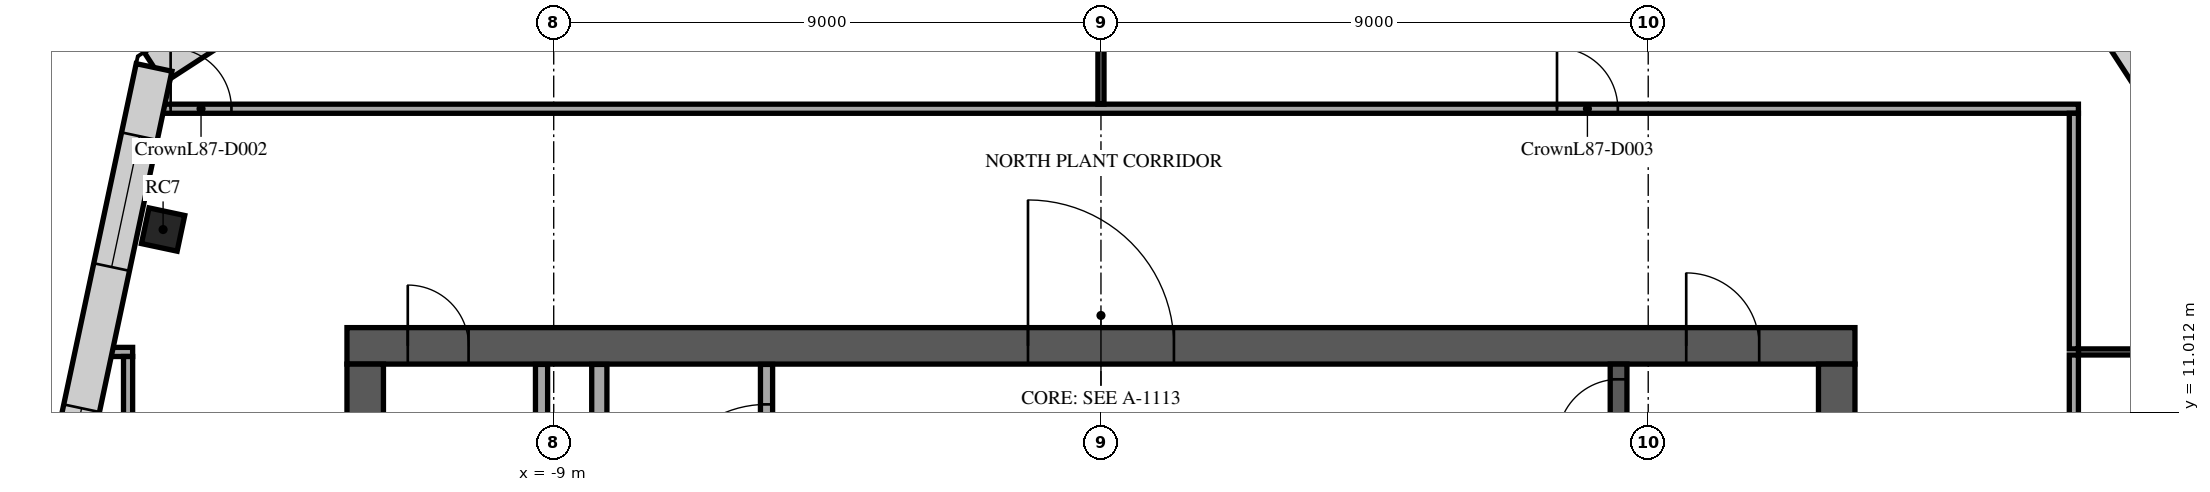
"""IFC4 building model, lengths in metres.
Left out: names, types, materials, properties, quantities, classifications, styles, units other than length and angle.
Written with IfcOpenShell. Run it as: python <this file> out.ifc"""

import sys

from ifc_helpers import new_model, si_unit, direction, frame, frame_2d, origin, origin_2d, place, context, subcontext, project, spatial, rectangle, extrude, element, fill, save


model = new_model("IFC4")
c1 = context("Model", 3, precision=1e-05, world=origin(), true_north=direction((0.0, 1.0)))
c2 = subcontext(c1, "Body", "Model", "MODEL_VIEW")
j1 = project(units=[si_unit("LENGTHUNIT", "METRE"), si_unit("PLANEANGLEUNIT", "RADIAN")], contexts=[c1])
p1 = place(None, origin())
s1 = spatial("IfcSite", under=j1, at=p1, CompositionType="ELEMENT")
p2 = place(p1, origin())
s2 = spatial("IfcBuilding", under=s1, at=p2, CompositionType="ELEMENT")
p3 = place(p2, frame((0.0, 0.0, 373.1)))
s3 = spatial("IfcBuildingStorey", under=s2, at=p3, CompositionType="ELEMENT", Elevation=373.1)
p4 = place(p3, frame((-15.424, 14.013, 0.0), z_axis=(0.0, 0.0, 1.0), x_axis=(0.207911690818, 0.978147600734, 0.0)))
e1 = element("IfcColumn", 1, at=p4, inside=s3, PredefinedType="COLUMN", context=c2, shape_type="SweptSolid", body=[
    extrude(rectangle(XDim=0.6, YDim=0.6, at=origin_2d()), origin(), (0.0, 0.0, 1.0), 3.5),
])
p5 = place(p3, frame((-12.4, 12.1, 0.0), z_axis=(0.0, 0.0, 1.0), x_axis=(1.0, 0.0, 0.0)))
e2 = element("IfcWall", 2, at=p5, inside=s3, PredefinedType="SHEAR", context=c2, shape_type="SweptSolid", body=[
    extrude(rectangle(XDim=24.8, YDim=0.6, at=frame_2d((12.4, 0.0))), origin(), (0.0, 0.0, 1.0), 3.2),
])
p6 = place(p5, frame((11.2, 0.0, 0.0)))
e3 = element("IfcOpeningElement", 3, at=p6, cuts=e2, PredefinedType="OPENING", context=c2, shape_type="SweptSolid", body=[
    extrude(rectangle(XDim=2.4, YDim=2.4, at=frame_2d((1.2, 1.2))), frame((0.0, 0.31, 0.0), z_axis=(0.0, -1.0, 0.0), x_axis=(1.0, 0.0, 0.0)), (0.0, 0.0, 1.0), 0.62),
])
p7 = place(p5, frame((22.025, 0.0, 0.0)))
e4 = element("IfcOpeningElement", 4, at=p7, cuts=e2, PredefinedType="OPENING", context=c2, shape_type="SweptSolid", body=[
    extrude(rectangle(XDim=1.2, YDim=2.1, at=frame_2d((0.6, 1.05))), frame((0.0, 0.31, 0.0), z_axis=(0.0, -1.0, 0.0), x_axis=(1.0, 0.0, 0.0)), (0.0, 0.0, 1.0), 0.62),
])
p8 = place(p5, frame((1.0, 0.0, 0.0)))
e5 = element("IfcOpeningElement", 5, at=p8, cuts=e2, PredefinedType="OPENING", context=c2, shape_type="SweptSolid", body=[
    extrude(rectangle(XDim=1.0, YDim=2.1, at=frame_2d((0.5, 1.05))), frame((0.0, 0.31, 0.0), z_axis=(0.0, -1.0, 0.0), x_axis=(1.0, 0.0, 0.0)), (0.0, 0.0, 1.0), 0.62),
])
p9 = place(p3, frame((12.1, -11.8, 0.0), z_axis=(0.0, 0.0, 1.0), x_axis=(0.0, 1.0, 0.0)))
e6 = element("IfcWall", 6, at=p9, inside=s3, PredefinedType="SHEAR", context=c2, shape_type="SweptSolid", body=[
    extrude(rectangle(XDim=23.6, YDim=0.6, at=frame_2d((11.8, 0.0))), origin(), (0.0, 0.0, 1.0), 3.2),
])
p10 = place(p9, frame((10.6, 0.0, 0.0)))
e7 = element("IfcOpeningElement", 7, at=p10, cuts=e6, PredefinedType="OPENING", context=c2, shape_type="SweptSolid", body=[
    extrude(rectangle(XDim=2.4, YDim=2.4, at=frame_2d((1.2, 1.2))), frame((0.0, 0.31, 0.0), z_axis=(0.0, -1.0, 0.0), x_axis=(1.0, 0.0, 0.0)), (0.0, 0.0, 1.0), 0.62),
])
p11 = place(p3, frame((-12.1, -11.8, 0.0), z_axis=(0.0, 0.0, 1.0), x_axis=(0.0, 1.0, 0.0)))
e8 = element("IfcWall", 8, at=p11, inside=s3, PredefinedType="SHEAR", context=c2, shape_type="SweptSolid", body=[
    extrude(rectangle(XDim=23.6, YDim=0.6, at=frame_2d((11.8, 0.0))), origin(), (0.0, 0.0, 1.0), 3.2),
])
p12 = place(p11, frame((10.6, 0.0, 0.0)))
e9 = element("IfcOpeningElement", 9, at=p12, cuts=e8, PredefinedType="OPENING", context=c2, shape_type="SweptSolid", body=[
    extrude(rectangle(XDim=2.4, YDim=2.4, at=frame_2d((1.2, 1.2))), frame((0.0, 0.31, 0.0), z_axis=(0.0, -1.0, 0.0), x_axis=(1.0, 0.0, 0.0)), (0.0, 0.0, 1.0), 0.62),
])
p13 = place(p3, frame((8.512, 4.55, 0.0), z_axis=(0.0, 0.0, 1.0), x_axis=(0.0, 1.0, 0.0)))
e10 = element("IfcWall", 10, at=p13, inside=s3, PredefinedType="SOLIDWALL", context=c2, shape_type="SweptSolid", body=[
    extrude(rectangle(XDim=7.25, YDim=0.275, at=frame_2d((3.625, 0.0))), origin(), (0.0, 0.0, 1.0), 3.2),
])
p14 = place(p13, frame((6.0, 0.0, 0.0)))
e11 = element("IfcOpeningElement", 11, at=p14, cuts=e10, PredefinedType="OPENING", context=c2, shape_type="SweptSolid", body=[
    extrude(rectangle(XDim=1.0, YDim=2.1, at=frame_2d((0.5, 1.05))), frame((0.0, 0.147, 0.0), z_axis=(0.0, -1.0, 0.0), x_axis=(1.0, 0.0, 0.0)), (0.0, 0.0, 1.0), 0.295),
])
p15 = place(p3, frame((-9.2, 4.78, 0.0), z_axis=(0.0, 0.0, 1.0), x_axis=(0.0, 1.0, 0.0)))
e12 = element("IfcWall", 12, at=p15, inside=s3, PredefinedType="PARTITIONING", context=c2, shape_type="SweptSolid", body=[
    extrude(rectangle(XDim=7.015, YDim=0.2, at=frame_2d((3.507, 0.0))), origin(), (0.0, 0.0, 1.0), 3.2),
])
p16 = place(p15, frame((2.92, 0.0, 0.0)))
e13 = element("IfcOpeningElement", 13, at=p16, cuts=e12, PredefinedType="OPENING", context=c2, shape_type="SweptSolid", body=[
    extrude(rectangle(XDim=1.0, YDim=2.1, at=frame_2d((0.5, 1.05))), frame((0.0, 0.11, 0.0), z_axis=(0.0, -1.0, 0.0), x_axis=(1.0, 0.0, 0.0)), (0.0, 0.0, 1.0), 0.22),
])
p17 = place(p3, frame((-8.25, 8.805, 0.0), z_axis=(0.0, 0.0, 1.0), x_axis=(0.0, 1.0, 0.0)))
e14 = element("IfcWall", 14, at=p17, inside=s3, PredefinedType="PARTITIONING", context=c2, shape_type="SweptSolid", body=[
    extrude(rectangle(XDim=2.99, YDim=0.25, at=frame_2d((1.495, 0.0))), origin(), (0.0, 0.0, 1.0), 3.2),
])
p18 = place(p17, frame((0.895, 0.0, 0.0)))
e15 = element("IfcOpeningElement", 15, at=p18, cuts=e14, PredefinedType="OPENING", context=c2, shape_type="SweptSolid", body=[
    extrude(rectangle(XDim=1.0, YDim=2.1, at=frame_2d((0.5, 1.05))), frame((0.0, 0.135, 0.0), z_axis=(0.0, -1.0, 0.0), x_axis=(1.0, 0.0, 0.0)), (0.0, 0.0, 1.0), 0.27),
])
p19 = place(p3, frame((-5.5, 8.805, 0.0), z_axis=(0.0, 0.0, 1.0), x_axis=(0.0, 1.0, 0.0)))
e16 = element("IfcWall", 16, at=p19, inside=s3, PredefinedType="PARTITIONING", context=c2, shape_type="SweptSolid", body=[
    extrude(rectangle(XDim=2.99, YDim=0.2, at=frame_2d((1.495, 0.0))), origin(), (0.0, 0.0, 1.0), 3.2),
])
p20 = place(p19, frame((0.532, 0.0, 0.0)))
e17 = element("IfcOpeningElement", 17, at=p20, cuts=e16, PredefinedType="OPENING", context=c2, shape_type="SweptSolid", body=[
    extrude(rectangle(XDim=1.8, YDim=2.1, at=frame_2d((0.9, 1.05))), frame((0.0, 0.11, 0.0), z_axis=(0.0, -1.0, 0.0), x_axis=(1.0, 0.0, 0.0)), (0.0, 0.0, 1.0), 0.22),
])
p21 = place(p3, frame((-16.465, 12.0, 0.0), z_axis=(0.0, 0.0, 1.0), x_axis=(1.0, 0.0, 0.0)))
e18 = element("IfcWall", 18, at=p21, inside=s3, PredefinedType="PARTITIONING", context=c2, shape_type="SweptSolid", body=[
    extrude(rectangle(XDim=0.54, YDim=0.15, at=frame_2d((0.27, 0.0))), origin(), (0.0, 0.0, 1.0), 3.2),
])
p22 = place(p3, frame((16.075, 12.0, 0.0), z_axis=(0.0, 0.0, 1.0), x_axis=(1.0, 0.0, 0.0)))
e19 = element("IfcWall", 19, at=p22, inside=s3, PredefinedType="PARTITIONING", context=c2, shape_type="SweptSolid", body=[
    extrude(rectangle(XDim=3.997, YDim=0.1, at=frame_2d((1.999, 0.0))), origin(), (0.0, 0.0, 1.0), 3.2),
])
p23 = place(p3, frame((-15.615, 16.0, 0.0), z_axis=(0.0, 0.0, 1.0), x_axis=(1.0, 0.0, 0.0)))
e20 = element("IfcWall", 20, at=p23, inside=s3, PredefinedType="PARTITIONING", context=c2, shape_type="SweptSolid", body=[
    extrude(rectangle(XDim=31.689, YDim=0.15, at=frame_2d((15.845, 0.0))), origin(), (0.0, 0.0, 1.0), 2.63),
])
p24 = place(p23, frame((0.315, 0.0, 0.0)))
e21 = element("IfcOpeningElement", 21, at=p24, cuts=e20, PredefinedType="OPENING", context=c2, shape_type="SweptSolid", body=[
    extrude(rectangle(XDim=1.0, YDim=2.1, at=frame_2d((0.5, 1.05))), frame((0.0, 0.085, 0.0), z_axis=(0.0, -1.0, 0.0), x_axis=(1.0, 0.0, 0.0)), (0.0, 0.0, 1.0), 0.17),
])
p25 = place(p23, frame((23.115, 0.0, 0.0)))
e22 = element("IfcOpeningElement", 22, at=p25, cuts=e20, PredefinedType="OPENING", context=c2, shape_type="SweptSolid", body=[
    extrude(rectangle(XDim=1.0, YDim=2.1, at=frame_2d((0.5, 1.05))), frame((0.0, 0.085, 0.0), z_axis=(0.0, -1.0, 0.0), x_axis=(1.0, 0.0, 0.0)), (0.0, 0.0, 1.0), 0.17),
])
p26 = place(p3, frame((-16.0, -15.925, 0.0), z_axis=(0.0, 0.0, 1.0), x_axis=(0.0, 1.0, 0.0)))
e23 = element("IfcWall", 23, at=p26, inside=s3, PredefinedType="PARTITIONING", context=c2, shape_type="SweptSolid", body=[
    extrude(rectangle(XDim=27.85, YDim=0.15, at=frame_2d((13.925, 0.0))), origin(), (0.0, 0.0, 1.0), 2.63),
])
p27 = place(p26, frame((15.425, 0.0, 0.0)))
e24 = element("IfcOpeningElement", 24, at=p27, cuts=e23, PredefinedType="OPENING", context=c2, shape_type="SweptSolid", body=[
    extrude(rectangle(XDim=1.0, YDim=2.1, at=frame_2d((0.5, 1.05))), frame((0.0, 0.085, 0.0), z_axis=(0.0, -1.0, 0.0), x_axis=(1.0, 0.0, 0.0)), (0.0, 0.0, 1.0), 0.17),
])
p28 = place(p3, frame((0.0, 16.075, 0.0), z_axis=(0.0, 0.0, 1.0), x_axis=(0.0, 1.0, 0.0)))
e25 = element("IfcWall", 25, at=p28, inside=s3, PredefinedType="PARTITIONING", context=c2, shape_type="SweptSolid", body=[
    extrude(rectangle(XDim=6.008, YDim=0.1, at=frame_2d((3.004, 0.0))), origin(), (0.0, 0.0, 1.0), 3.2),
])
p29 = place(p3, frame((16.0, -11.925, 0.0), z_axis=(0.0, 0.0, 1.0), x_axis=(0.0, 1.0, 0.0)))
e26 = element("IfcWall", 26, at=p29, inside=s3, PredefinedType="PARTITIONING", context=c2, shape_type="SweptSolid", body=[
    extrude(rectangle(XDim=23.875, YDim=0.15, at=frame_2d((11.938, 0.0))), origin(), (0.0, 0.0, 1.0), 2.63),
])
p30 = place(p29, frame((11.425, 0.0, 0.0)))
e27 = element("IfcOpeningElement", 27, at=p30, cuts=e26, PredefinedType="OPENING", context=c2, shape_type="SweptSolid", body=[
    extrude(rectangle(XDim=1.0, YDim=2.1, at=frame_2d((0.5, 1.05))), frame((0.0, 0.085, 0.0), z_axis=(0.0, -1.0, 0.0), x_axis=(1.0, 0.0, 0.0)), (0.0, 0.0, 1.0), 0.17),
])
p31 = place(p3, frame((16.0, 12.05, 0.0), z_axis=(0.0, 0.0, 1.0), x_axis=(0.0, 1.0, 0.0)))
e28 = element("IfcWall", 28, at=p31, inside=s3, PredefinedType="PARTITIONING", context=c2, shape_type="SweptSolid", body=[
    extrude(rectangle(XDim=3.875, YDim=0.15, at=frame_2d((1.938, 0.0))), origin(), (0.0, 0.0, 1.0), 2.63),
])
p32 = place(p3, frame((21.304, 10.286, 0.0), z_axis=(0.0, 0.0, 1.0), x_axis=(-0.544646568575, 0.838665675546, 0.0)))
e29 = element("IfcWall", 29, at=p32, inside=s3, PredefinedType="STANDARD", context=c2, shape_type="SweptSolid", body=[
    extrude(rectangle(XDim=10.195, YDim=0.6, at=frame_2d((5.098, 0.0))), origin(), (0.0, 0.0, 1.0), 3.2),
])
p33 = place(p32, frame((1.149, 0.0, 0.6)))
e30 = element("IfcOpeningElement", 30, at=p33, cuts=e29, PredefinedType="OPENING", context=c2, shape_type="SweptSolid", body=[
    extrude(rectangle(XDim=2.8, YDim=1.85, at=frame_2d((1.4, 0.925))), frame((0.0, 0.31, 0.0), z_axis=(0.0, -1.0, 0.0), x_axis=(1.0, 0.0, 0.0)), (0.0, 0.0, 1.0), 0.62),
])
p34 = place(p32, frame((6.246, 0.0, 0.6)))
e31 = element("IfcOpeningElement", 31, at=p34, cuts=e29, PredefinedType="OPENING", context=c2, shape_type="SweptSolid", body=[
    extrude(rectangle(XDim=2.8, YDim=1.85, at=frame_2d((1.4, 0.925))), frame((0.0, 0.31, 0.0), z_axis=(0.0, -1.0, 0.0), x_axis=(1.0, 0.0, 0.0)), (0.0, 0.0, 1.0), 0.62),
])
p35 = place(p3, frame((-5.345, 23.321, 0.0), z_axis=(0.0, 0.0, 1.0), x_axis=(-0.838670411522, -0.544639275887, 0.0)))
e32 = element("IfcWall", 32, at=p35, inside=s3, PredefinedType="STANDARD", context=c2, shape_type="SweptSolid", body=[
    extrude(rectangle(XDim=12.195, YDim=0.6, at=frame_2d((6.097, 0.0))), origin(), (0.0, 0.0, 1.0), 3.2),
])
p36 = place(p35, frame((1.162, 0.0, 0.6)))
e33 = element("IfcOpeningElement", 33, at=p36, cuts=e32, PredefinedType="OPENING", context=c2, shape_type="SweptSolid", body=[
    extrude(rectangle(XDim=1.7, YDim=1.85, at=frame_2d((0.85, 0.925))), frame((0.0, 0.31, 0.0), z_axis=(0.0, -1.0, 0.0), x_axis=(1.0, 0.0, 0.0)), (0.0, 0.0, 1.0), 0.62),
])
p37 = place(p35, frame((5.248, 0.0, 0.6)))
e34 = element("IfcOpeningElement", 34, at=p37, cuts=e32, PredefinedType="OPENING", context=c2, shape_type="SweptSolid", body=[
    extrude(rectangle(XDim=1.7, YDim=1.85, at=frame_2d((0.85, 0.925))), frame((0.0, 0.31, 0.0), z_axis=(0.0, -1.0, 0.0), x_axis=(1.0, 0.0, 0.0)), (0.0, 0.0, 1.0), 0.62),
])
p38 = place(p35, frame((9.333, 0.0, 0.6)))
e35 = element("IfcOpeningElement", 35, at=p38, cuts=e32, PredefinedType="OPENING", context=c2, shape_type="SweptSolid", body=[
    extrude(rectangle(XDim=1.7, YDim=1.85, at=frame_2d((0.85, 0.925))), frame((0.0, 0.31, 0.0), z_axis=(0.0, -1.0, 0.0), x_axis=(1.0, 0.0, 0.0)), (0.0, 0.0, 1.0), 0.62),
])
p39 = place(p3, frame((-15.573, 16.679, 0.0), z_axis=(0.0, 0.0, 1.0), x_axis=(-0.207912773383, -0.978147370627, 0.0)))
e36 = element("IfcWall", 36, at=p39, inside=s3, PredefinedType="STANDARD", context=c2, shape_type="SweptSolid", body=[
    extrude(rectangle(XDim=27.568, YDim=0.6, at=frame_2d((13.784, 0.0))), origin(), (0.0, 0.0, 1.0), 3.2),
])
p40 = place(p39, frame((1.156, 0.0, 0.6)))
e37 = element("IfcOpeningElement", 37, at=p40, cuts=e36, PredefinedType="OPENING", context=c2, shape_type="SweptSolid", body=[
    extrude(rectangle(XDim=2.2, YDim=1.85, at=frame_2d((1.1, 0.925))), frame((0.0, 0.31, 0.0), z_axis=(0.0, -1.0, 0.0), x_axis=(1.0, 0.0, 0.0)), (0.0, 0.0, 1.0), 0.62),
])
p41 = place(p39, frame((5.73, 0.0, 0.6)))
e38 = element("IfcOpeningElement", 38, at=p41, cuts=e36, PredefinedType="OPENING", context=c2, shape_type="SweptSolid", body=[
    extrude(rectangle(XDim=2.2, YDim=1.85, at=frame_2d((1.1, 0.925))), frame((0.0, 0.31, 0.0), z_axis=(0.0, -1.0, 0.0), x_axis=(1.0, 0.0, 0.0)), (0.0, 0.0, 1.0), 0.62),
])
p42 = place(p39, frame((10.366, 0.0, 0.6)))
e39 = element("IfcOpeningElement", 39, at=p42, cuts=e36, PredefinedType="OPENING", context=c2, shape_type="SweptSolid", body=[
    extrude(rectangle(XDim=2.2, YDim=1.85, at=frame_2d((1.1, 0.925))), frame((0.0, 0.31, 0.0), z_axis=(0.0, -1.0, 0.0), x_axis=(1.0, 0.0, 0.0)), (0.0, 0.0, 1.0), 0.62),
])
p43 = place(p39, frame((15.002, 0.0, 0.6)))
e40 = element("IfcOpeningElement", 40, at=p43, cuts=e36, PredefinedType="OPENING", context=c2, shape_type="SweptSolid", body=[
    extrude(rectangle(XDim=2.2, YDim=1.85, at=frame_2d((1.1, 0.925))), frame((0.0, 0.31, 0.0), z_axis=(0.0, -1.0, 0.0), x_axis=(1.0, 0.0, 0.0)), (0.0, 0.0, 1.0), 0.62),
])
p44 = place(p39, frame((19.638, 0.0, 0.6)))
e41 = element("IfcOpeningElement", 41, at=p44, cuts=e36, PredefinedType="OPENING", context=c2, shape_type="SweptSolid", body=[
    extrude(rectangle(XDim=2.2, YDim=1.85, at=frame_2d((1.1, 0.925))), frame((0.0, 0.31, 0.0), z_axis=(0.0, -1.0, 0.0), x_axis=(1.0, 0.0, 0.0)), (0.0, 0.0, 1.0), 0.62),
])
p45 = place(p39, frame((24.212, 0.0, 0.6)))
e42 = element("IfcOpeningElement", 42, at=p45, cuts=e36, PredefinedType="OPENING", context=c2, shape_type="SweptSolid", body=[
    extrude(rectangle(XDim=2.2, YDim=1.85, at=frame_2d((1.1, 0.925))), frame((0.0, 0.31, 0.0), z_axis=(0.0, -1.0, 0.0), x_axis=(1.0, 0.0, 0.0)), (0.0, 0.0, 1.0), 0.62),
])
p46 = place(p6, origin())
e43 = element("IfcDoor", 43, at=p46, inside=s3, OperationType="SINGLE_SWING_LEFT", PredefinedType="DOOR", context=c2, shape_type="SweptSolid", body=[
    extrude(rectangle(XDim=2.4, YDim=2.4, at=frame_2d((1.2, 1.2))), frame((0.0, 0.025, 0.0), z_axis=(0.0, -1.0, 0.0), x_axis=(1.0, 0.0, 0.0)), (0.0, 0.0, 1.0), 0.05),
])
fill(e3, e43)
p47 = place(p7, origin())
e44 = element("IfcDoor", 44, at=p47, inside=s3, OperationType="SINGLE_SWING_LEFT", PredefinedType="DOOR", context=c2, shape_type="SweptSolid", body=[
    extrude(rectangle(XDim=1.2, YDim=2.1, at=frame_2d((0.6, 1.05))), frame((0.0, 0.025, 0.0), z_axis=(0.0, -1.0, 0.0), x_axis=(1.0, 0.0, 0.0)), (0.0, 0.0, 1.0), 0.05),
])
fill(e4, e44)
p48 = place(p8, origin())
e45 = element("IfcDoor", 45, at=p48, inside=s3, OperationType="SINGLE_SWING_LEFT", PredefinedType="DOOR", context=c2, shape_type="SweptSolid", body=[
    extrude(rectangle(XDim=1.0, YDim=2.1, at=frame_2d((0.5, 1.05))), frame((0.0, 0.025, 0.0), z_axis=(0.0, -1.0, 0.0), x_axis=(1.0, 0.0, 0.0)), (0.0, 0.0, 1.0), 0.05),
])
fill(e5, e45)
p49 = place(p14, origin())
e46 = element("IfcDoor", 46, at=p49, inside=s3, OperationType="SINGLE_SWING_LEFT", PredefinedType="DOOR", context=c2, shape_type="SweptSolid", body=[
    extrude(rectangle(XDim=1.0, YDim=2.1, at=frame_2d((0.5, 1.05))), frame((0.0, 0.025, 0.0), z_axis=(0.0, -1.0, 0.0), x_axis=(1.0, 0.0, 0.0)), (0.0, 0.0, 1.0), 0.05),
])
fill(e11, e46)
p50 = place(p20, origin())
e47 = element("IfcDoor", 47, at=p50, inside=s3, OperationType="SINGLE_SWING_LEFT", PredefinedType="DOOR", context=c2, shape_type="SweptSolid", body=[
    extrude(rectangle(XDim=1.8, YDim=2.1, at=frame_2d((0.9, 1.05))), frame((0.0, 0.025, 0.0), z_axis=(0.0, -1.0, 0.0), x_axis=(1.0, 0.0, 0.0)), (0.0, 0.0, 1.0), 0.05),
])
fill(e17, e47)
p51 = place(p24, origin())
e48 = element("IfcDoor", 48, at=p51, inside=s3, OperationType="SINGLE_SWING_RIGHT", PredefinedType="DOOR", context=c2, shape_type="SweptSolid", body=[
    extrude(rectangle(XDim=1.0, YDim=2.1, at=frame_2d((0.5, 1.05))), frame((0.0, 0.025, 0.0), z_axis=(0.0, -1.0, 0.0), x_axis=(1.0, 0.0, 0.0)), (0.0, 0.0, 1.0), 0.05),
])
fill(e21, e48)
p52 = place(p25, origin())
e49 = element("IfcDoor", 49, at=p52, inside=s3, OperationType="SINGLE_SWING_LEFT", PredefinedType="DOOR", context=c2, shape_type="SweptSolid", body=[
    extrude(rectangle(XDim=1.0, YDim=2.1, at=frame_2d((0.5, 1.05))), frame((0.0, 0.025, 0.0), z_axis=(0.0, -1.0, 0.0), x_axis=(1.0, 0.0, 0.0)), (0.0, 0.0, 1.0), 0.05),
])
fill(e22, e49)
p53 = place(p34, origin())
e50 = element("IfcWindow", 50, at=p53, inside=s3, PartitioningType="SINGLE_PANEL", PredefinedType="USERDEFINED", context=c2, shape_type="SweptSolid", body=[
    extrude(rectangle(XDim=2.8, YDim=1.85, at=frame_2d((1.4, 0.925))), frame((0.0, 0.03, 0.0), z_axis=(0.0, -1.0, 0.0), x_axis=(1.0, 0.0, 0.0)), (0.0, 0.0, 1.0), 0.06),
])
fill(e31, e50)
p54 = place(p40, origin())
e51 = element("IfcWindow", 51, at=p54, inside=s3, PartitioningType="SINGLE_PANEL", PredefinedType="USERDEFINED", context=c2, shape_type="SweptSolid", body=[
    extrude(rectangle(XDim=2.2, YDim=1.85, at=frame_2d((1.1, 0.925))), frame((0.0, 0.03, 0.0), z_axis=(0.0, -1.0, 0.0), x_axis=(1.0, 0.0, 0.0)), (0.0, 0.0, 1.0), 0.06),
])
fill(e37, e51)
p55 = place(p41, origin())
e52 = element("IfcWindow", 52, at=p55, inside=s3, PartitioningType="SINGLE_PANEL", PredefinedType="USERDEFINED", context=c2, shape_type="SweptSolid", body=[
    extrude(rectangle(XDim=2.2, YDim=1.85, at=frame_2d((1.1, 0.925))), frame((0.0, 0.03, 0.0), z_axis=(0.0, -1.0, 0.0), x_axis=(1.0, 0.0, 0.0)), (0.0, 0.0, 1.0), 0.06),
])
fill(e38, e52)
save(model, sys.argv[1])
